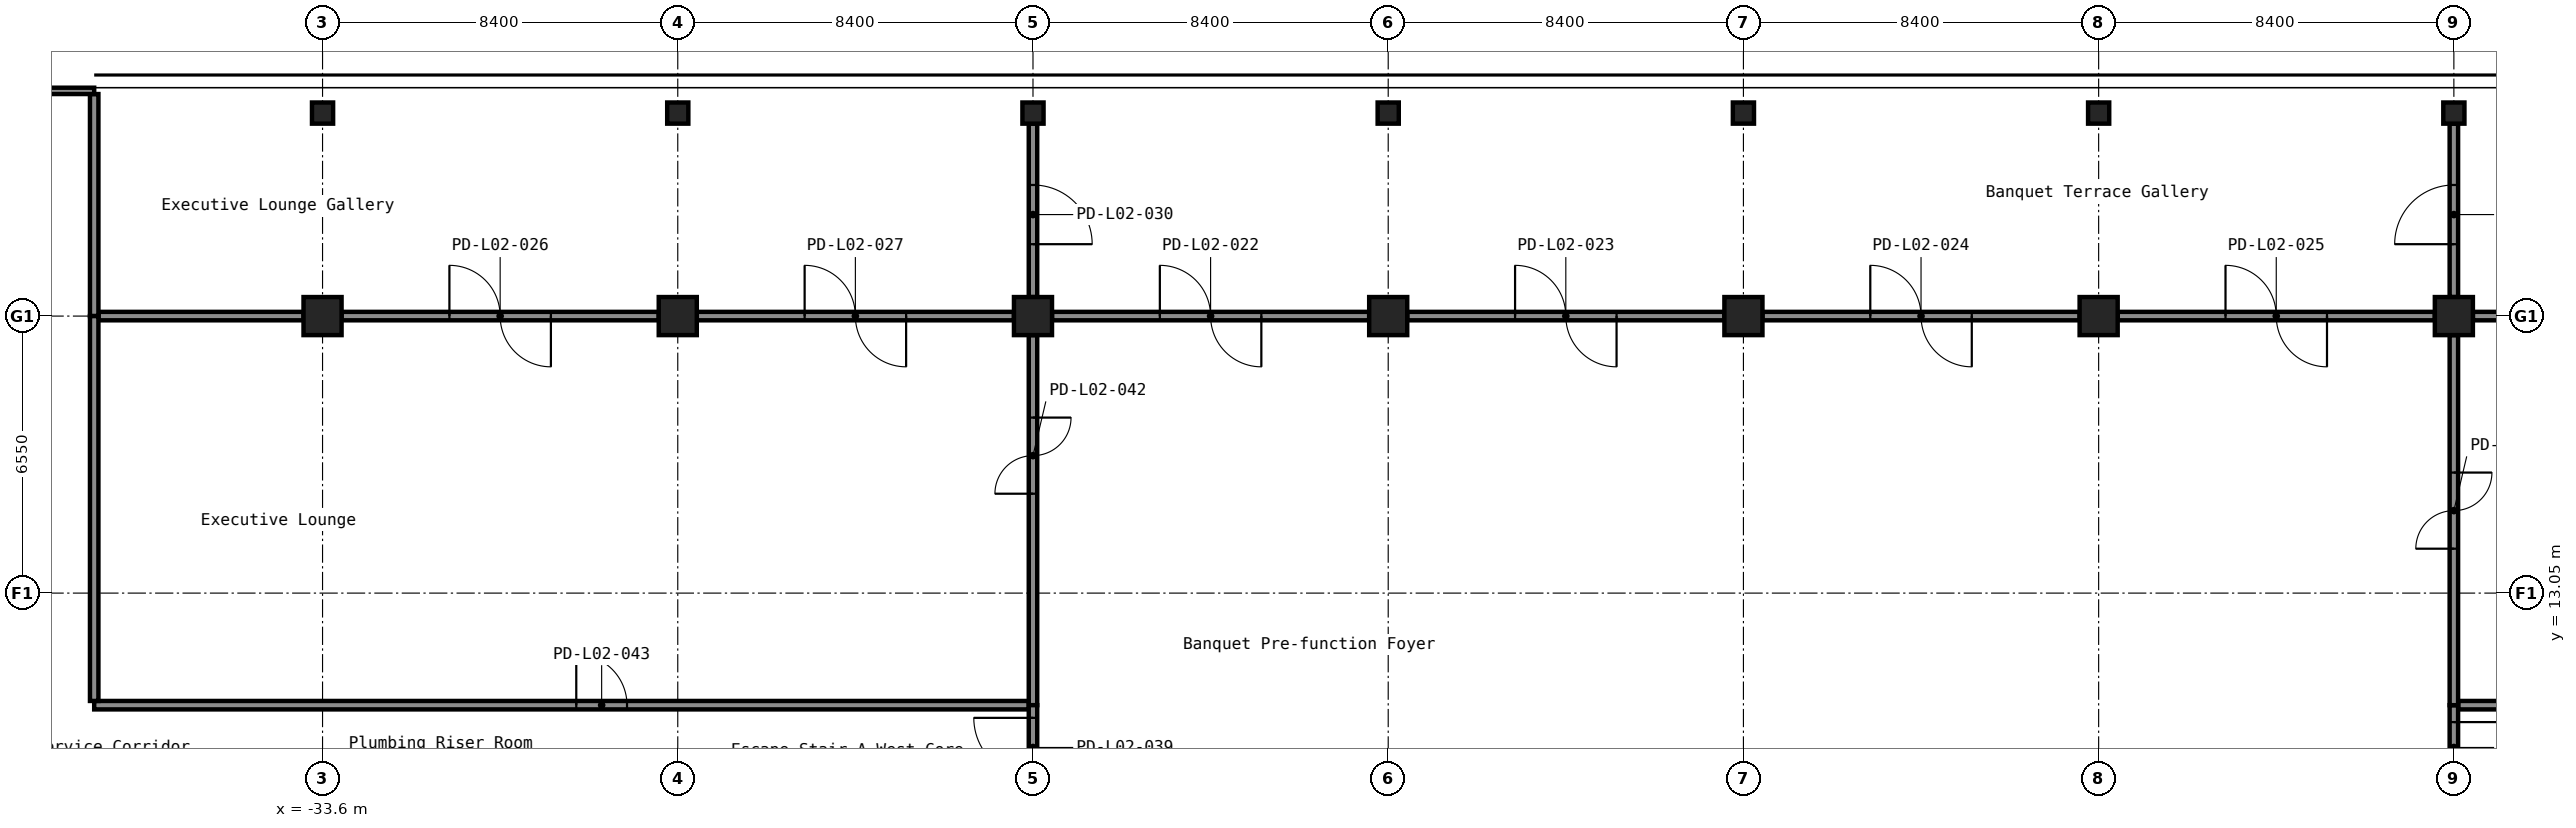
"""IFC4 building model, lengths in metres.
Left out: names, types, materials, properties, quantities, classifications, styles, units other than length and angle.
Written with IfcOpenShell. Run it as: python <this file> out.ifc"""

import sys

from ifc_helpers import new_model, si_unit, direction, frame, frame_2d, origin, origin_2d, place, context, subcontext, project, spatial, rectangle, hollow_rectangle, extrude, element, fill, save


model = new_model("IFC4")
c1 = context("Model", 3, precision=1e-05, world=origin(), true_north=direction((0.0, 1.0)))
c2 = subcontext(c1, "Body", "Model", "MODEL_VIEW")
j1 = project(units=[si_unit("LENGTHUNIT", "METRE"), si_unit("PLANEANGLEUNIT", "RADIAN")], contexts=[c1])
p1 = place(None, origin())
s1 = spatial("IfcSite", under=j1, at=p1, CompositionType="ELEMENT")
p2 = place(p1, origin())
s2 = spatial("IfcBuilding", under=s1, at=p2, CompositionType="ELEMENT")
p3 = place(p2, frame((0.0, 0.0, 9.0)))
s3 = spatial("IfcBuildingStorey", under=s2, at=p3, CompositionType="ELEMENT", Elevation=9.0)
for number, where, z_axis, x_axis in (
    (1, (-33.6, 19.6, 0.0), (0.0, 0.0, 1.0), (1.0, 0.0, 0.0)),
    (2, (-25.2, 19.6, 0.0), (0.0, 0.0, 1.0), (1.0, 0.0, 0.0)),
    (3, (-16.8, 19.6, 0.0), (0.0, 0.0, 1.0), (1.0, 0.0, 0.0)),
    (4, (-8.4, 19.6, 0.0), (0.0, 0.0, 1.0), (1.0, 0.0, 0.0)),
    (5, (0.0, 19.6, 0.0), (0.0, 0.0, 1.0), (1.0, 0.0, 0.0)),
    (6, (8.4, 19.6, 0.0), (0.0, 0.0, 1.0), (1.0, 0.0, 0.0)),
    (7, (16.8, 19.6, 0.0), (0.0, 0.0, 1.0), (1.0, 0.0, 0.0)),
):
    element("IfcColumn", number, at=place(p3, frame(where, z_axis=z_axis, x_axis=x_axis)), inside=s3, PredefinedType="COLUMN", context=c2, shape_type="SweptSolid", body=[
        extrude(hollow_rectangle(XDim=0.9, YDim=0.9, WallThickness=0.036, at=origin_2d()), origin(), (0.0, 0.0, 1.0), 5.6),
    ])
for number, where, z_axis, x_axis in (
    (8, (-33.6, 24.4, 0.0), (0.0, 0.0, 1.0), (1.0, 0.0, 0.0)),
    (9, (-25.2, 24.4, 0.0), (0.0, 0.0, 1.0), (1.0, 0.0, 0.0)),
    (10, (-16.8, 24.4, 0.0), (0.0, 0.0, 1.0), (1.0, 0.0, 0.0)),
    (11, (-8.4, 24.4, 0.0), (0.0, 0.0, 1.0), (1.0, 0.0, 0.0)),
    (12, (0.0, 24.4, 0.0), (0.0, 0.0, 1.0), (1.0, 0.0, 0.0)),
    (13, (8.4, 24.4, 0.0), (0.0, 0.0, 1.0), (1.0, 0.0, 0.0)),
    (14, (16.8, 24.4, 0.0), (0.0, 0.0, 1.0), (1.0, 0.0, 0.0)),
):
    element("IfcColumn", number, at=place(p3, frame(where, z_axis=z_axis, x_axis=x_axis)), inside=s3, PredefinedType="COLUMN", context=c2, shape_type="SweptSolid", body=[
        extrude(hollow_rectangle(XDim=0.5, YDim=0.5, WallThickness=0.019, InnerFilletRadius=0.029, OuterFilletRadius=0.048, at=origin_2d()), origin(), (0.0, 0.0, 1.0), 5.6),
    ])
p4 = place(p3, frame((16.8, 24.15, 0.0), z_axis=(0.0, 0.0, 1.0), x_axis=(0.0, -1.0, 0.0)))
e15 = element("IfcWall", 15, at=p4, inside=s3, PredefinedType="PARTITIONING", context=c2, shape_type="SweptSolid", body=[
    extrude(rectangle(XDim=4.1, YDim=0.2, at=frame_2d((2.05, 0.0))), origin(), (0.0, 0.0, 1.0), 5.6),
])
p5 = place(p4, frame((1.45, 0.0, 0.0)))
e16 = element("IfcOpeningElement", 16, at=p5, cuts=e15, PredefinedType="OPENING", context=c2, shape_type="SweptSolid", body=[
    extrude(rectangle(XDim=1.4, YDim=2.1, at=frame_2d((0.7, 1.05))), frame((0.0, 0.11, 0.0), z_axis=(0.0, -1.0, 0.0), x_axis=(1.0, 0.0, 0.0)), (0.0, 0.0, 1.0), 0.22),
])
p6 = place(p3, frame((-16.8, 20.05, 0.0), z_axis=(0.0, 0.0, 1.0), x_axis=(0.0, 1.0, 0.0)))
e17 = element("IfcWall", 17, at=p6, inside=s3, PredefinedType="PARTITIONING", context=c2, shape_type="SweptSolid", body=[
    extrude(rectangle(XDim=4.1, YDim=0.2, at=frame_2d((2.05, 0.0))), origin(), (0.0, 0.0, 1.0), 5.6),
])
p7 = place(p6, frame((1.25, 0.0, 0.0)))
e18 = element("IfcOpeningElement", 18, at=p7, cuts=e17, PredefinedType="OPENING", context=c2, shape_type="SweptSolid", body=[
    extrude(rectangle(XDim=1.4, YDim=2.1, at=frame_2d((0.7, 1.05))), frame((0.0, 0.11, 0.0), z_axis=(0.0, -1.0, 0.0), x_axis=(1.0, 0.0, 0.0)), (0.0, 0.0, 1.0), 0.22),
])
p8 = place(p3, frame((17.25, 19.6, 0.0), z_axis=(0.0, 0.0, 1.0), x_axis=(1.0, 0.0, 0.0)))
e19 = element("IfcWall", 19, at=p8, inside=s3, PredefinedType="PARTITIONING", context=c2, shape_type="SweptSolid", body=[
    extrude(rectangle(XDim=7.5, YDim=0.2, at=frame_2d((3.75, 0.0))), origin(), (0.0, 0.0, 1.0), 5.6),
])
p9 = place(p8, frame((2.55, 0.0, 0.0)))
e20 = element("IfcOpeningElement", 20, at=p9, cuts=e19, PredefinedType="OPENING", context=c2, shape_type="SweptSolid", body=[
    extrude(rectangle(XDim=2.4, YDim=2.1, at=frame_2d((1.2, 1.05))), frame((0.0, 0.11, 0.0), z_axis=(0.0, -1.0, 0.0), x_axis=(1.0, 0.0, 0.0)), (0.0, 0.0, 1.0), 0.22),
])
p10 = place(p3, frame((16.9, 10.4, 0.0), z_axis=(0.0, 0.0, 1.0), x_axis=(1.0, 0.0, 0.0)))
e21 = element("IfcWall", 21, at=p10, inside=s3, PredefinedType="PARTITIONING", context=c2, shape_type="SweptSolid", body=[
    extrude(rectangle(XDim=22.1, YDim=0.2, at=frame_2d((11.05, 0.0))), origin(), (0.0, 0.0, 1.0), 5.6),
])
p11 = place(p10, frame((10.5, 0.0, 0.0)))
e22 = element("IfcOpeningElement", 22, at=p11, cuts=e21, PredefinedType="OPENING", context=c2, shape_type="SweptSolid", body=[
    extrude(rectangle(XDim=1.2, YDim=2.1, at=frame_2d((0.6, 1.05))), frame((0.0, 0.11, 0.0), z_axis=(0.0, -1.0, 0.0), x_axis=(1.0, 0.0, 0.0)), (0.0, 0.0, 1.0), 0.22),
])
p12 = place(p3, frame((16.8, 8.4, 0.0), z_axis=(0.0, 0.0, 1.0), x_axis=(0.0, 1.0, 0.0)))
e23 = element("IfcWall", 23, at=p12, inside=s3, PredefinedType="PARTITIONING", context=c2, shape_type="SweptSolid", body=[
    extrude(rectangle(XDim=2.0, YDim=0.2, at=frame_2d((1.0, 0.0))), origin(), (0.0, 0.0, 1.0), 5.6),
])
p13 = place(p12, frame((0.4, 0.0, 0.0)))
e24 = element("IfcOpeningElement", 24, at=p13, cuts=e23, PredefinedType="OPENING", context=c2, shape_type="SweptSolid", body=[
    extrude(rectangle(XDim=1.2, YDim=2.1, at=frame_2d((0.6, 1.05))), frame((0.0, 0.11, 0.0), z_axis=(0.0, -1.0, 0.0), x_axis=(1.0, 0.0, 0.0)), (0.0, 0.0, 1.0), 0.22),
])
p14 = place(p3, frame((-38.9, 19.6, 0.0), z_axis=(0.0, 0.0, 1.0), x_axis=(1.0, 0.0, 0.0)))
e25 = element("IfcWall", 25, at=p14, inside=s3, PredefinedType="PARTITIONING", context=c2, shape_type="SweptSolid", body=[
    extrude(rectangle(XDim=4.85, YDim=0.2, at=frame_2d((2.425, 0.0))), origin(), (0.0, 0.0, 1.0), 5.6),
])
p15 = place(p3, frame((-33.15, 19.6, 0.0), z_axis=(0.0, 0.0, 1.0), x_axis=(1.0, 0.0, 0.0)))
e26 = element("IfcWall", 26, at=p15, inside=s3, PredefinedType="PARTITIONING", context=c2, shape_type="SweptSolid", body=[
    extrude(rectangle(XDim=7.5, YDim=0.2, at=frame_2d((3.75, 0.0))), origin(), (0.0, 0.0, 1.0), 5.6),
])
p16 = place(p15, frame((2.55, 0.0, 0.0)))
e27 = element("IfcOpeningElement", 27, at=p16, cuts=e26, PredefinedType="OPENING", context=c2, shape_type="SweptSolid", body=[
    extrude(rectangle(XDim=2.4, YDim=2.1, at=frame_2d((1.2, 1.05))), frame((0.0, 0.11, 0.0), z_axis=(0.0, -1.0, 0.0), x_axis=(1.0, 0.0, 0.0)), (0.0, 0.0, 1.0), 0.22),
])
p17 = place(p3, frame((-24.75, 19.6, 0.0), z_axis=(0.0, 0.0, 1.0), x_axis=(1.0, 0.0, 0.0)))
e28 = element("IfcWall", 28, at=p17, inside=s3, PredefinedType="PARTITIONING", context=c2, shape_type="SweptSolid", body=[
    extrude(rectangle(XDim=7.5, YDim=0.2, at=frame_2d((3.75, 0.0))), origin(), (0.0, 0.0, 1.0), 5.6),
])
p18 = place(p17, frame((2.55, 0.0, 0.0)))
e29 = element("IfcOpeningElement", 29, at=p18, cuts=e28, PredefinedType="OPENING", context=c2, shape_type="SweptSolid", body=[
    extrude(rectangle(XDim=2.4, YDim=2.1, at=frame_2d((1.2, 1.05))), frame((0.0, 0.11, 0.0), z_axis=(0.0, -1.0, 0.0), x_axis=(1.0, 0.0, 0.0)), (0.0, 0.0, 1.0), 0.22),
])
p19 = place(p3, frame((-16.35, 19.6, 0.0), z_axis=(0.0, 0.0, 1.0), x_axis=(1.0, 0.0, 0.0)))
e30 = element("IfcWall", 30, at=p19, inside=s3, PredefinedType="PARTITIONING", context=c2, shape_type="SweptSolid", body=[
    extrude(rectangle(XDim=7.5, YDim=0.2, at=frame_2d((3.75, 0.0))), origin(), (0.0, 0.0, 1.0), 5.6),
])
p20 = place(p19, frame((2.55, 0.0, 0.0)))
e31 = element("IfcOpeningElement", 31, at=p20, cuts=e30, PredefinedType="OPENING", context=c2, shape_type="SweptSolid", body=[
    extrude(rectangle(XDim=2.4, YDim=2.1, at=frame_2d((1.2, 1.05))), frame((0.0, 0.11, 0.0), z_axis=(0.0, -1.0, 0.0), x_axis=(1.0, 0.0, 0.0)), (0.0, 0.0, 1.0), 0.22),
])
p21 = place(p3, frame((-7.95, 19.6, 0.0), z_axis=(0.0, 0.0, 1.0), x_axis=(1.0, 0.0, 0.0)))
e32 = element("IfcWall", 32, at=p21, inside=s3, PredefinedType="PARTITIONING", context=c2, shape_type="SweptSolid", body=[
    extrude(rectangle(XDim=7.5, YDim=0.2, at=frame_2d((3.75, 0.0))), origin(), (0.0, 0.0, 1.0), 5.6),
])
p22 = place(p21, frame((2.55, 0.0, 0.0)))
e33 = element("IfcOpeningElement", 33, at=p22, cuts=e32, PredefinedType="OPENING", context=c2, shape_type="SweptSolid", body=[
    extrude(rectangle(XDim=2.4, YDim=2.1, at=frame_2d((1.2, 1.05))), frame((0.0, 0.11, 0.0), z_axis=(0.0, -1.0, 0.0), x_axis=(1.0, 0.0, 0.0)), (0.0, 0.0, 1.0), 0.22),
])
p23 = place(p3, frame((0.45, 19.6, 0.0), z_axis=(0.0, 0.0, 1.0), x_axis=(1.0, 0.0, 0.0)))
e34 = element("IfcWall", 34, at=p23, inside=s3, PredefinedType="PARTITIONING", context=c2, shape_type="SweptSolid", body=[
    extrude(rectangle(XDim=7.5, YDim=0.2, at=frame_2d((3.75, 0.0))), origin(), (0.0, 0.0, 1.0), 5.6),
])
p24 = place(p23, frame((2.55, 0.0, 0.0)))
e35 = element("IfcOpeningElement", 35, at=p24, cuts=e34, PredefinedType="OPENING", context=c2, shape_type="SweptSolid", body=[
    extrude(rectangle(XDim=2.4, YDim=2.1, at=frame_2d((1.2, 1.05))), frame((0.0, 0.11, 0.0), z_axis=(0.0, -1.0, 0.0), x_axis=(1.0, 0.0, 0.0)), (0.0, 0.0, 1.0), 0.22),
])
p25 = place(p3, frame((8.85, 19.6, 0.0), z_axis=(0.0, 0.0, 1.0), x_axis=(1.0, 0.0, 0.0)))
e36 = element("IfcWall", 36, at=p25, inside=s3, PredefinedType="PARTITIONING", context=c2, shape_type="SweptSolid", body=[
    extrude(rectangle(XDim=7.5, YDim=0.2, at=frame_2d((3.75, 0.0))), origin(), (0.0, 0.0, 1.0), 5.6),
])
p26 = place(p25, frame((2.55, 0.0, 0.0)))
e37 = element("IfcOpeningElement", 37, at=p26, cuts=e36, PredefinedType="OPENING", context=c2, shape_type="SweptSolid", body=[
    extrude(rectangle(XDim=2.4, YDim=2.1, at=frame_2d((1.2, 1.05))), frame((0.0, 0.11, 0.0), z_axis=(0.0, -1.0, 0.0), x_axis=(1.0, 0.0, 0.0)), (0.0, 0.0, 1.0), 0.22),
])
p27 = place(p3, frame((16.8, 19.15, 0.0), z_axis=(0.0, 0.0, 1.0), x_axis=(0.0, -1.0, 0.0)))
e38 = element("IfcWall", 38, at=p27, inside=s3, PredefinedType="PARTITIONING", context=c2, shape_type="SweptSolid", body=[
    extrude(rectangle(XDim=8.75, YDim=0.2, at=frame_2d((4.375, 0.0))), origin(), (0.0, 0.0, 1.0), 5.6),
])
p28 = place(p27, frame((3.25, 0.0, 0.0)))
e39 = element("IfcOpeningElement", 39, at=p28, cuts=e38, PredefinedType="OPENING", context=c2, shape_type="SweptSolid", body=[
    extrude(rectangle(XDim=1.8, YDim=2.1, at=frame_2d((0.9, 1.05))), frame((0.0, 0.11, 0.0), z_axis=(0.0, -1.0, 0.0), x_axis=(1.0, 0.0, 0.0)), (0.0, 0.0, 1.0), 0.22),
])
p29 = place(p3, frame((-16.8, 10.4, 0.0), z_axis=(0.0, 0.0, 1.0), x_axis=(0.0, 1.0, 0.0)))
e40 = element("IfcWall", 40, at=p29, inside=s3, PredefinedType="PARTITIONING", context=c2, shape_type="SweptSolid", body=[
    extrude(rectangle(XDim=8.75, YDim=0.2, at=frame_2d((4.375, 0.0))), origin(), (0.0, 0.0, 1.0), 5.6),
])
p30 = place(p29, frame((5.0, 0.0, 0.0)))
e41 = element("IfcOpeningElement", 41, at=p30, cuts=e40, PredefinedType="OPENING", context=c2, shape_type="SweptSolid", body=[
    extrude(rectangle(XDim=1.8, YDim=2.1, at=frame_2d((0.9, 1.05))), frame((0.0, 0.11, 0.0), z_axis=(0.0, -1.0, 0.0), x_axis=(1.0, 0.0, 0.0)), (0.0, 0.0, 1.0), 0.22),
])
p31 = place(p3, frame((-39.0, 24.85, 0.0), z_axis=(0.0, 0.0, 1.0), x_axis=(0.0, -1.0, 0.0)))
e42 = element("IfcWall", 42, at=p31, inside=s3, PredefinedType="PARTITIONING", context=c2, shape_type="SweptSolid", body=[
    extrude(rectangle(XDim=5.25, YDim=0.2, at=frame_2d((2.625, 0.0))), origin(), (0.0, 0.0, 1.0), 5.6),
])
p32 = place(p3, frame((-39.0, 10.4, 0.0), z_axis=(0.0, 0.0, 1.0), x_axis=(1.0, 0.0, 0.0)))
e43 = element("IfcWall", 43, at=p32, inside=s3, PredefinedType="PARTITIONING", context=c2, shape_type="SweptSolid", body=[
    extrude(rectangle(XDim=22.1, YDim=0.2, at=frame_2d((11.05, 0.0))), origin(), (0.0, 0.0, 1.0), 5.6),
])
p33 = place(p32, frame((11.4, 0.0, 0.0)))
e44 = element("IfcOpeningElement", 44, at=p33, cuts=e43, PredefinedType="OPENING", context=c2, shape_type="SweptSolid", body=[
    extrude(rectangle(XDim=1.2, YDim=2.1, at=frame_2d((0.6, 1.05))), frame((0.0, 0.11, 0.0), z_axis=(0.0, -1.0, 0.0), x_axis=(1.0, 0.0, 0.0)), (0.0, 0.0, 1.0), 0.22),
])
p34 = place(p3, frame((-39.0, 19.6, 0.0), z_axis=(0.0, 0.0, 1.0), x_axis=(0.0, -1.0, 0.0)))
e45 = element("IfcWall", 45, at=p34, inside=s3, PredefinedType="PARTITIONING", context=c2, shape_type="SweptSolid", body=[
    extrude(rectangle(XDim=9.1, YDim=0.2, at=frame_2d((4.55, 0.0))), origin(), (0.0, 0.0, 1.0), 5.6),
])
p35 = place(p3, frame((-16.8, 10.4, 0.0), z_axis=(0.0, 0.0, 1.0), x_axis=(0.0, -1.0, 0.0)))
e46 = element("IfcWall", 46, at=p35, inside=s3, PredefinedType="PARTITIONING", context=c2, shape_type="SweptSolid", body=[
    extrude(rectangle(XDim=2.0, YDim=0.2, at=frame_2d((1.0, 0.0))), origin(), (0.0, 0.0, 1.0), 5.6),
])
p36 = place(p35, frame((0.3, 0.0, 0.0)))
e47 = element("IfcOpeningElement", 47, at=p36, cuts=e46, PredefinedType="OPENING", context=c2, shape_type="SweptSolid", body=[
    extrude(rectangle(XDim=1.4, YDim=2.1, at=frame_2d((0.7, 1.05))), frame((0.0, 0.11, 0.0), z_axis=(0.0, -1.0, 0.0), x_axis=(1.0, 0.0, 0.0)), (0.0, 0.0, 1.0), 0.22),
])
p37 = place(p3, frame((-51.98, 24.925, 0.0), z_axis=(0.0, 0.0, 1.0), x_axis=(1.0, 0.0, 0.0)))
e48 = element("IfcWall", 48, at=p37, inside=s3, PredefinedType="STANDARD", context=c2, shape_type="SweptSolid", body=[
    extrude(rectangle(XDim=12.98, YDim=0.15, at=frame_2d((6.49, 0.0))), origin(), (0.0, 0.0, 1.0), 5.6),
])
p38 = place(p20, origin())
e49 = element("IfcDoor", 49, at=p38, inside=s3, OperationType="DOUBLE_DOOR_DOUBLE_SWING", PredefinedType="DOOR", context=c2, shape_type="SweptSolid", body=[
    extrude(rectangle(XDim=2.4, YDim=2.1, at=frame_2d((1.2, 1.05))), frame((0.0, 0.025, 0.0), z_axis=(0.0, -1.0, 0.0), x_axis=(1.0, 0.0, 0.0)), (0.0, 0.0, 1.0), 0.05),
])
fill(e31, e49)
p39 = place(p22, origin())
e50 = element("IfcDoor", 50, at=p39, inside=s3, OperationType="DOUBLE_DOOR_DOUBLE_SWING", PredefinedType="DOOR", context=c2, shape_type="SweptSolid", body=[
    extrude(rectangle(XDim=2.4, YDim=2.1, at=frame_2d((1.2, 1.05))), frame((0.0, 0.025, 0.0), z_axis=(0.0, -1.0, 0.0), x_axis=(1.0, 0.0, 0.0)), (0.0, 0.0, 1.0), 0.05),
])
fill(e33, e50)
p40 = place(p24, origin())
e51 = element("IfcDoor", 51, at=p40, inside=s3, OperationType="DOUBLE_DOOR_DOUBLE_SWING", PredefinedType="DOOR", context=c2, shape_type="SweptSolid", body=[
    extrude(rectangle(XDim=2.4, YDim=2.1, at=frame_2d((1.2, 1.05))), frame((0.0, 0.025, 0.0), z_axis=(0.0, -1.0, 0.0), x_axis=(1.0, 0.0, 0.0)), (0.0, 0.0, 1.0), 0.05),
])
fill(e35, e51)
p41 = place(p26, origin())
e52 = element("IfcDoor", 52, at=p41, inside=s3, OperationType="DOUBLE_DOOR_DOUBLE_SWING", PredefinedType="DOOR", context=c2, shape_type="SweptSolid", body=[
    extrude(rectangle(XDim=2.4, YDim=2.1, at=frame_2d((1.2, 1.05))), frame((0.0, 0.025, 0.0), z_axis=(0.0, -1.0, 0.0), x_axis=(1.0, 0.0, 0.0)), (0.0, 0.0, 1.0), 0.05),
])
fill(e37, e52)
p42 = place(p16, origin())
e53 = element("IfcDoor", 53, at=p42, inside=s3, OperationType="DOUBLE_DOOR_DOUBLE_SWING", PredefinedType="DOOR", context=c2, shape_type="SweptSolid", body=[
    extrude(rectangle(XDim=2.4, YDim=2.1, at=frame_2d((1.2, 1.05))), frame((0.0, 0.025, 0.0), z_axis=(0.0, -1.0, 0.0), x_axis=(1.0, 0.0, 0.0)), (0.0, 0.0, 1.0), 0.05),
])
fill(e27, e53)
p43 = place(p18, origin())
e54 = element("IfcDoor", 54, at=p43, inside=s3, OperationType="DOUBLE_DOOR_DOUBLE_SWING", PredefinedType="DOOR", context=c2, shape_type="SweptSolid", body=[
    extrude(rectangle(XDim=2.4, YDim=2.1, at=frame_2d((1.2, 1.05))), frame((0.0, 0.025, 0.0), z_axis=(0.0, -1.0, 0.0), x_axis=(1.0, 0.0, 0.0)), (0.0, 0.0, 1.0), 0.05),
])
fill(e29, e54)
p44 = place(p7, origin())
e55 = element("IfcDoor", 55, at=p44, inside=s3, OperationType="SINGLE_SWING_LEFT", PredefinedType="DOOR", context=c2, shape_type="SweptSolid", body=[
    extrude(rectangle(XDim=1.4, YDim=2.1, at=frame_2d((0.7, 1.05))), frame((0.0, 0.025, 0.0), z_axis=(0.0, -1.0, 0.0), x_axis=(1.0, 0.0, 0.0)), (0.0, 0.0, 1.0), 0.05),
])
fill(e18, e55)
p45 = place(p5, origin())
e56 = element("IfcDoor", 56, at=p45, inside=s3, OperationType="SINGLE_SWING_RIGHT", PredefinedType="DOOR", context=c2, shape_type="SweptSolid", body=[
    extrude(rectangle(XDim=1.4, YDim=2.1, at=frame_2d((0.7, 1.05))), frame((0.0, 0.025, 0.0), z_axis=(0.0, -1.0, 0.0), x_axis=(1.0, 0.0, 0.0)), (0.0, 0.0, 1.0), 0.05),
])
fill(e16, e56)
p46 = place(p36, origin())
e57 = element("IfcDoor", 57, at=p46, inside=s3, OperationType="SINGLE_SWING_LEFT", PredefinedType="DOOR", context=c2, shape_type="SweptSolid", body=[
    extrude(rectangle(XDim=1.4, YDim=2.1, at=frame_2d((0.7, 1.05))), frame((0.0, 0.025, 0.0), z_axis=(0.0, -1.0, 0.0), x_axis=(1.0, 0.0, 0.0)), (0.0, 0.0, 1.0), 0.05),
])
fill(e47, e57)
p47 = place(p13, origin())
e58 = element("IfcDoor", 58, at=p47, inside=s3, OperationType="SINGLE_SWING_RIGHT", PredefinedType="DOOR", context=c2, shape_type="SweptSolid", body=[
    extrude(rectangle(XDim=1.2, YDim=2.1, at=frame_2d((0.6, 1.05))), frame((0.0, 0.025, 0.0), z_axis=(0.0, -1.0, 0.0), x_axis=(1.0, 0.0, 0.0)), (0.0, 0.0, 1.0), 0.05),
])
fill(e24, e58)
p48 = place(p28, origin())
e59 = element("IfcDoor", 59, at=p48, inside=s3, OperationType="DOUBLE_DOOR_DOUBLE_SWING", PredefinedType="DOOR", context=c2, shape_type="SweptSolid", body=[
    extrude(rectangle(XDim=1.8, YDim=2.1, at=frame_2d((0.9, 1.05))), frame((0.0, 0.025, 0.0), z_axis=(0.0, -1.0, 0.0), x_axis=(1.0, 0.0, 0.0)), (0.0, 0.0, 1.0), 0.05),
])
fill(e39, e59)
p49 = place(p30, origin())
e60 = element("IfcDoor", 60, at=p49, inside=s3, OperationType="DOUBLE_DOOR_DOUBLE_SWING", PredefinedType="DOOR", context=c2, shape_type="SweptSolid", body=[
    extrude(rectangle(XDim=1.8, YDim=2.1, at=frame_2d((0.9, 1.05))), frame((0.0, 0.025, 0.0), z_axis=(0.0, -1.0, 0.0), x_axis=(1.0, 0.0, 0.0)), (0.0, 0.0, 1.0), 0.05),
])
fill(e41, e60)
p50 = place(p33, origin())
e61 = element("IfcDoor", 61, at=p50, inside=s3, OperationType="SINGLE_SWING_RIGHT", PredefinedType="DOOR", context=c2, shape_type="SweptSolid", body=[
    extrude(rectangle(XDim=1.2, YDim=2.1, at=frame_2d((0.6, 1.05))), frame((0.0, 0.025, 0.0), z_axis=(0.0, -1.0, 0.0), x_axis=(1.0, 0.0, 0.0)), (0.0, 0.0, 1.0), 0.05),
])
fill(e44, e61)
save(model, sys.argv[1])
